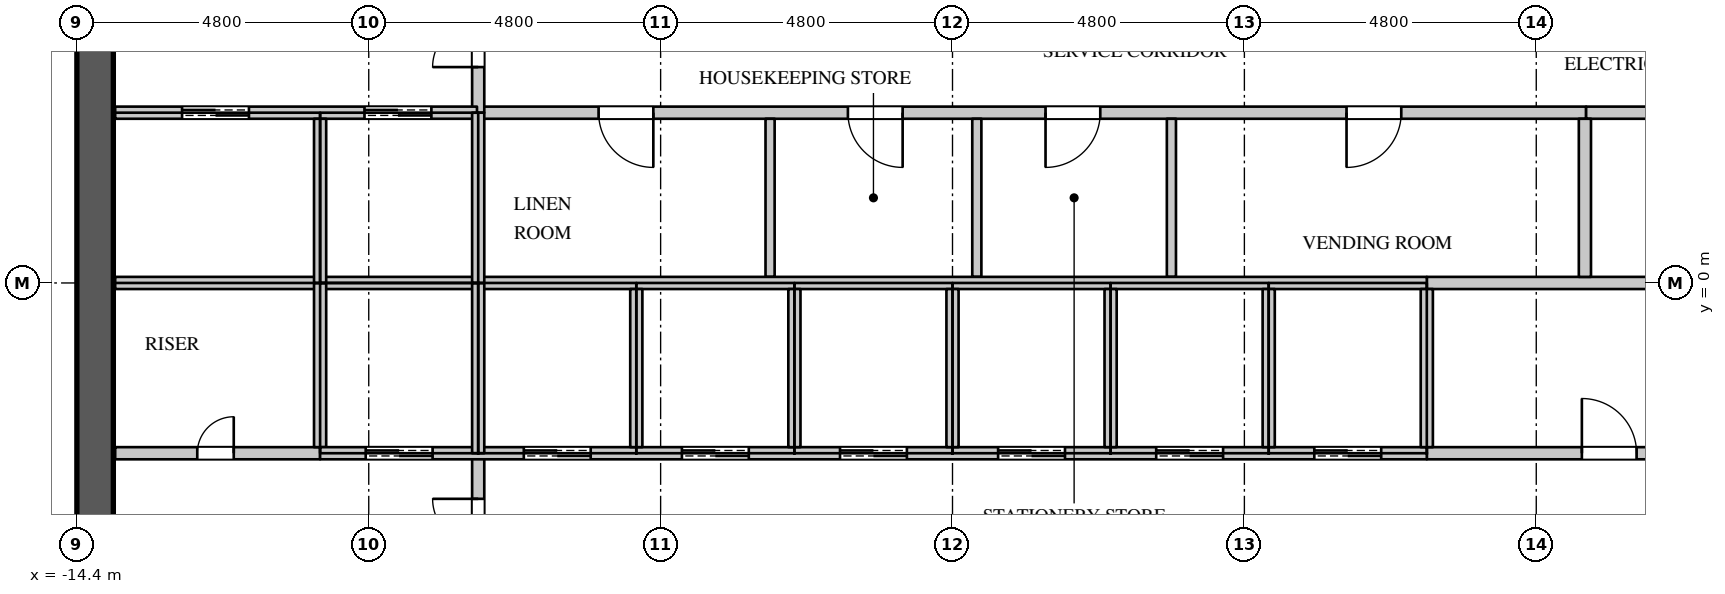
"""IFC4 building model, lengths in metres.
Left out: names, types, materials, properties, quantities, classifications, styles, units other than length and angle.
Written with IfcOpenShell. Run it as: python <this file> out.ifc"""

import sys

from ifc_helpers import new_model, si_unit, direction, frame, frame_2d, origin, place, context, subcontext, project, spatial, rectangle, extrude, element, fill, save


model = new_model("IFC4")
c1 = context("Model", 3, precision=1e-05, world=origin(), true_north=direction((0.0, 1.0)))
c2 = subcontext(c1, "Body", "Model", "MODEL_VIEW")
j1 = project(units=[si_unit("LENGTHUNIT", "METRE"), si_unit("PLANEANGLEUNIT", "RADIAN")], contexts=[c1])
p1 = place(None, origin())
s1 = spatial("IfcSite", under=j1, at=p1, CompositionType="ELEMENT")
p2 = place(p1, origin())
s2 = spatial("IfcBuilding", under=s1, at=p2, CompositionType="ELEMENT")
p3 = place(p2, frame((0.0, 0.0, 310.5)))
s3 = spatial("IfcBuildingStorey", under=s2, at=p3, CompositionType="ELEMENT", Elevation=310.5)
p4 = place(p3, frame((-14.1, -11.4, 0.0), z_axis=(0.0, 0.0, 1.0), x_axis=(0.0, 1.0, 0.0)))
e1 = element("IfcWall", 1, at=p4, inside=s3, PredefinedType="SHEAR", context=c2, shape_type="SweptSolid", body=[
    extrude(rectangle(XDim=22.8, YDim=0.6, at=frame_2d((11.4, 0.0))), origin(), (0.0, 0.0, 1.0), 4.2),
])
p5 = place(p4, frame((20.45, 0.0, 0.0)))
e2 = element("IfcOpeningElement", 2, at=p5, cuts=e1, PredefinedType="OPENING", context=c2, shape_type="SweptSolid", body=[
    extrude(rectangle(XDim=1.1, YDim=2.2, at=frame_2d((0.55, 1.1))), frame((0.0, 0.31, 0.0), z_axis=(0.0, -1.0, 0.0), x_axis=(1.0, 0.0, 0.0)), (0.0, 0.0, 1.0), 0.62),
])
p6 = place(p4, frame((1.25, 0.0, 0.0)))
e3 = element("IfcOpeningElement", 3, at=p6, cuts=e1, PredefinedType="OPENING", context=c2, shape_type="SweptSolid", body=[
    extrude(rectangle(XDim=1.1, YDim=2.2, at=frame_2d((0.55, 1.1))), frame((0.0, 0.31, 0.0), z_axis=(0.0, -1.0, 0.0), x_axis=(1.0, 0.0, 0.0)), (0.0, 0.0, 1.0), 0.62),
])
p7 = place(p4, frame((16.15, 0.0, 0.0)))
e4 = element("IfcOpeningElement", 4, at=p7, cuts=e1, PredefinedType="OPENING", context=c2, shape_type="SweptSolid", body=[
    extrude(rectangle(XDim=1.5, YDim=2.4, at=frame_2d((0.75, 1.2))), frame((0.0, 0.31, 0.0), z_axis=(0.0, -1.0, 0.0), x_axis=(1.0, 0.0, 0.0)), (0.0, 0.0, 1.0), 0.62),
])
p8 = place(p4, frame((5.15, 0.0, 0.0)))
e5 = element("IfcOpeningElement", 5, at=p8, cuts=e1, PredefinedType="OPENING", context=c2, shape_type="SweptSolid", body=[
    extrude(rectangle(XDim=1.5, YDim=2.4, at=frame_2d((0.75, 1.2))), frame((0.0, 0.31, 0.0), z_axis=(0.0, -1.0, 0.0), x_axis=(1.0, 0.0, 0.0)), (0.0, 0.0, 1.0), 0.62),
])
p9 = place(p3, frame((-7.82, 2.8, 0.0), z_axis=(0.0, 0.0, 1.0), x_axis=(1.0, 0.0, 0.0)))
e6 = element("IfcWall", 6, at=p9, inside=s3, PredefinedType="PARTITIONING", context=c2, shape_type="SweptSolid", body=[
    extrude(rectangle(XDim=18.24, YDim=0.2, at=frame_2d((9.12, 0.0))), origin(), (0.0, 0.0, 1.0), 3.9),
])
p10 = place(p9, frame((2.0, 0.0, 0.0)))
e7 = element("IfcOpeningElement", 7, at=p10, cuts=e6, PredefinedType="OPENING", context=c2, shape_type="SweptSolid", body=[
    extrude(rectangle(XDim=0.9, YDim=2.2, at=frame_2d((0.45, 1.1))), frame((0.0, 0.11, 0.0), z_axis=(0.0, -1.0, 0.0), x_axis=(1.0, 0.0, 0.0)), (0.0, 0.0, 1.0), 0.22),
])
p11 = place(p9, frame((6.1, 0.0, 0.0)))
e8 = element("IfcOpeningElement", 8, at=p11, cuts=e6, PredefinedType="OPENING", context=c2, shape_type="SweptSolid", body=[
    extrude(rectangle(XDim=0.9, YDim=2.2, at=frame_2d((0.45, 1.1))), frame((0.0, 0.11, 0.0), z_axis=(0.0, -1.0, 0.0), x_axis=(1.0, 0.0, 0.0)), (0.0, 0.0, 1.0), 0.22),
])
p12 = place(p9, frame((9.35, 0.0, 0.0)))
e9 = element("IfcOpeningElement", 9, at=p12, cuts=e6, PredefinedType="OPENING", context=c2, shape_type="SweptSolid", body=[
    extrude(rectangle(XDim=0.9, YDim=2.2, at=frame_2d((0.45, 1.1))), frame((0.0, 0.11, 0.0), z_axis=(0.0, -1.0, 0.0), x_axis=(1.0, 0.0, 0.0)), (0.0, 0.0, 1.0), 0.22),
])
p13 = place(p9, frame((14.3, 0.0, 0.0)))
e10 = element("IfcOpeningElement", 10, at=p13, cuts=e6, PredefinedType="OPENING", context=c2, shape_type="SweptSolid", body=[
    extrude(rectangle(XDim=0.9, YDim=2.2, at=frame_2d((0.45, 1.1))), frame((0.0, 0.11, 0.0), z_axis=(0.0, -1.0, 0.0), x_axis=(1.0, 0.0, 0.0)), (0.0, 0.0, 1.0), 0.22),
])
p14 = place(p3, frame((-7.8, -5.8, 0.0), z_axis=(0.0, 0.0, 1.0), x_axis=(0.0, 1.0, 0.0)))
e11 = element("IfcWall", 11, at=p14, inside=s3, PredefinedType="PARTITIONING", context=c2, shape_type="SweptSolid", body=[
    extrude(rectangle(XDim=3.0, YDim=0.2, at=frame_2d((1.5, 0.0))), origin(), (0.0, 0.0, 1.0), 3.9),
])
p15 = place(p14, frame((0.75, 0.0, 0.0)))
e12 = element("IfcOpeningElement", 12, at=p15, cuts=e11, PredefinedType="OPENING", context=c2, shape_type="SweptSolid", body=[
    extrude(rectangle(XDim=1.5, YDim=2.4, at=frame_2d((0.75, 1.2))), frame((0.0, 0.11, 0.0), z_axis=(0.0, -1.0, 0.0), x_axis=(1.0, 0.0, 0.0)), (0.0, 0.0, 1.0), 0.22),
])
p16 = place(p3, frame((-7.8, 2.8, 0.0), z_axis=(0.0, 0.0, 1.0), x_axis=(0.0, 1.0, 0.0)))
e13 = element("IfcWall", 13, at=p16, inside=s3, PredefinedType="PARTITIONING", context=c2, shape_type="SweptSolid", body=[
    extrude(rectangle(XDim=5.275, YDim=0.2, at=frame_2d((2.637, 0.0))), origin(), (0.0, 0.0, 1.0), 3.9),
])
p17 = place(p16, frame((0.75, 0.0, 0.0)))
e14 = element("IfcOpeningElement", 14, at=p17, cuts=e13, PredefinedType="OPENING", context=c2, shape_type="SweptSolid", body=[
    extrude(rectangle(XDim=1.5, YDim=2.4, at=frame_2d((0.75, 1.2))), frame((0.0, 0.11, 0.0), z_axis=(0.0, -1.0, 0.0), x_axis=(1.0, 0.0, 0.0)), (0.0, 0.0, 1.0), 0.22),
])
for number, where, z_axis, x_axis in (
    (15, (-3.0, 0.1, 0.0), (0.0, 0.0, 1.0), (0.0, 1.0, 0.0)),
    (16, (0.4, 0.1, 0.0), (0.0, 0.0, 1.0), (0.0, 1.0, 0.0)),
    (17, (3.6, 0.1, 0.0), (0.0, 0.0, 1.0), (0.0, 1.0, 0.0)),
):
    element("IfcWall", number, at=place(p3, frame(where, z_axis=z_axis, x_axis=x_axis)), inside=s3, PredefinedType="PARTITIONING", context=c2, shape_type="SweptSolid", body=[
        extrude(rectangle(XDim=2.6, YDim=0.15, at=frame_2d((1.3, 0.0))), origin(), (0.0, 0.0, 1.0), 3.9),
    ])
p18 = place(p3, frame((-13.77, -2.8, 0.0), z_axis=(0.0, 0.0, 1.0), x_axis=(1.0, 0.0, 0.0)))
e18 = element("IfcWall", 18, at=p18, inside=s3, PredefinedType="PARTITIONING", context=c2, shape_type="SweptSolid", body=[
    extrude(rectangle(XDim=3.37, YDim=0.2, at=frame_2d((1.685, 0.0))), origin(), (0.0, 0.0, 1.0), 3.9),
])
p19 = place(p18, frame((1.35, 0.0, 0.0)))
e19 = element("IfcOpeningElement", 19, at=p19, cuts=e18, PredefinedType="OPENING", context=c2, shape_type="SweptSolid", body=[
    extrude(rectangle(XDim=0.6, YDim=2.0, at=frame_2d((0.3, 1.0))), frame((0.0, 0.11, 0.0), z_axis=(0.0, -1.0, 0.0), x_axis=(1.0, 0.0, 0.0)), (0.0, 0.0, 1.0), 0.22),
])
p20 = place(p3, frame((7.8, -2.8, 0.0), z_axis=(0.0, 0.0, 1.0), x_axis=(1.0, 0.0, 0.0)))
e20 = element("IfcWall", 20, at=p20, inside=s3, PredefinedType="PARTITIONING", context=c2, shape_type="SweptSolid", body=[
    extrude(rectangle(XDim=5.97, YDim=0.2, at=frame_2d((2.985, 0.0))), origin(), (0.0, 0.0, 1.0), 3.9),
])
p21 = place(p20, frame((2.55, 0.0, 0.0)))
e21 = element("IfcOpeningElement", 21, at=p21, cuts=e20, PredefinedType="OPENING", context=c2, shape_type="SweptSolid", body=[
    extrude(rectangle(XDim=0.9, YDim=2.2, at=frame_2d((0.45, 1.1))), frame((0.0, 0.11, 0.0), z_axis=(0.0, -1.0, 0.0), x_axis=(1.0, 0.0, 0.0)), (0.0, 0.0, 1.0), 0.22),
])
p22 = place(p3, frame((7.8, 0.0, 0.0), z_axis=(0.0, 0.0, 1.0), x_axis=(1.0, 0.0, 0.0)))
e22 = element("IfcWall", 22, at=p22, inside=s3, PredefinedType="PARTITIONING", context=c2, shape_type="SweptSolid", body=[
    extrude(rectangle(XDim=5.97, YDim=0.2, at=frame_2d((2.985, 0.0))), origin(), (0.0, 0.0, 1.0), 3.9),
])
p23 = place(p3, frame((10.42, 2.8, 0.0), z_axis=(0.0, 0.0, 1.0), x_axis=(1.0, 0.0, 0.0)))
e23 = element("IfcWall", 23, at=p23, inside=s3, PredefinedType="PARTITIONING", context=c2, shape_type="SweptSolid", body=[
    extrude(rectangle(XDim=3.35, YDim=0.2, at=frame_2d((1.675, 0.0))), origin(), (0.0, 0.0, 1.0), 3.9),
])
p24 = place(p23, frame((1.35, 0.0, 0.0)))
e24 = element("IfcOpeningElement", 24, at=p24, cuts=e23, PredefinedType="OPENING", context=c2, shape_type="SweptSolid", body=[
    extrude(rectangle(XDim=0.6, YDim=2.0, at=frame_2d((0.3, 1.0))), frame((0.0, 0.11, 0.0), z_axis=(0.0, -1.0, 0.0), x_axis=(1.0, 0.0, 0.0)), (0.0, 0.0, 1.0), 0.22),
])
p25 = place(p3, frame((10.4, 0.1, 0.0), z_axis=(0.0, 0.0, 1.0), x_axis=(0.0, 1.0, 0.0)))
e25 = element("IfcWall", 25, at=p25, inside=s3, PredefinedType="PARTITIONING", context=c2, shape_type="SweptSolid", body=[
    extrude(rectangle(XDim=2.6, YDim=0.2, at=frame_2d((1.3, 0.0))), origin(), (0.0, 0.0, 1.0), 3.9),
])
p26 = place(p3, frame((-13.77, 0.0, 0.0), z_axis=(0.0, 0.0, 1.0), x_axis=(1.0, 0.0, 0.0)))
e26 = element("IfcWall", 26, at=p26, inside=s3, PredefinedType="PARTITIONING", context=c2, shape_type="SweptSolid", body=[
    extrude(rectangle(XDim=21.57, YDim=0.2, at=frame_2d((10.785, 0.0))), origin(), (0.0, 0.0, 1.0), 3.9),
])
p27 = place(p3, frame((-13.77, 2.8, 0.0), z_axis=(0.0, 0.0, 1.0), x_axis=(1.0, 0.0, 0.0)))
e27 = element("IfcWall", 27, at=p27, inside=s3, PredefinedType="PARTITIONING", context=c2, shape_type="SweptSolid", body=[
    extrude(rectangle(XDim=5.95, YDim=0.2, at=frame_2d((2.975, 0.0))), origin(), (0.0, 0.0, 1.0), 3.9),
])
p28 = place(p27, frame((1.1, 0.0, 0.0)))
e28 = element("IfcOpeningElement", 28, at=p28, cuts=e27, PredefinedType="OPENING", context=c2, shape_type="SweptSolid", body=[
    extrude(rectangle(XDim=1.1, YDim=2.2, at=frame_2d((0.55, 1.1))), frame((0.0, 0.11, 0.0), z_axis=(0.0, -1.0, 0.0), x_axis=(1.0, 0.0, 0.0)), (0.0, 0.0, 1.0), 0.22),
])
p29 = place(p27, frame((4.1, 0.0, 0.0)))
e29 = element("IfcOpeningElement", 29, at=p29, cuts=e27, PredefinedType="OPENING", context=c2, shape_type="SweptSolid", body=[
    extrude(rectangle(XDim=1.1, YDim=2.2, at=frame_2d((0.55, 1.1))), frame((0.0, 0.11, 0.0), z_axis=(0.0, -1.0, 0.0), x_axis=(1.0, 0.0, 0.0)), (0.0, 0.0, 1.0), 0.22),
])
p30 = place(p3, frame((-10.4, -2.7, 0.0), z_axis=(0.0, 0.0, 1.0), x_axis=(0.0, 1.0, 0.0)))
e30 = element("IfcWall", 30, at=p30, inside=s3, PredefinedType="PARTITIONING", context=c2, shape_type="SweptSolid", body=[
    extrude(rectangle(XDim=2.7, YDim=0.2, at=frame_2d((1.35, 0.0))), origin(), (0.0, 0.0, 1.0), 3.9),
])
p31 = place(p3, frame((-10.4, -2.8, 0.0), z_axis=(0.0, 0.0, 1.0), x_axis=(1.0, 0.0, 0.0)))
e31 = element("IfcWall", 31, at=p31, inside=s3, PredefinedType="PARTITIONING", context=c2, shape_type="SweptSolid", body=[
    extrude(rectangle(XDim=18.2, YDim=0.2, at=frame_2d((9.1, 0.0))), origin(), (0.0, 0.0, 1.0), 3.9),
])
p32 = place(p31, frame((0.75, 0.0, 0.0)))
e32 = element("IfcOpeningElement", 32, at=p32, cuts=e31, PredefinedType="OPENING", context=c2, shape_type="SweptSolid", body=[
    extrude(rectangle(XDim=1.1, YDim=2.2, at=frame_2d((0.55, 1.1))), frame((0.0, 0.11, 0.0), z_axis=(0.0, -1.0, 0.0), x_axis=(1.0, 0.0, 0.0)), (0.0, 0.0, 1.0), 0.22),
])
p33 = place(p31, frame((3.35, 0.0, 0.0)))
e33 = element("IfcOpeningElement", 33, at=p33, cuts=e31, PredefinedType="OPENING", context=c2, shape_type="SweptSolid", body=[
    extrude(rectangle(XDim=1.1, YDim=2.2, at=frame_2d((0.55, 1.1))), frame((0.0, 0.11, 0.0), z_axis=(0.0, -1.0, 0.0), x_axis=(1.0, 0.0, 0.0)), (0.0, 0.0, 1.0), 0.22),
])
p34 = place(p31, frame((5.95, 0.0, 0.0)))
e34 = element("IfcOpeningElement", 34, at=p34, cuts=e31, PredefinedType="OPENING", context=c2, shape_type="SweptSolid", body=[
    extrude(rectangle(XDim=1.1, YDim=2.2, at=frame_2d((0.55, 1.1))), frame((0.0, 0.11, 0.0), z_axis=(0.0, -1.0, 0.0), x_axis=(1.0, 0.0, 0.0)), (0.0, 0.0, 1.0), 0.22),
])
p35 = place(p31, frame((8.55, 0.0, 0.0)))
e35 = element("IfcOpeningElement", 35, at=p35, cuts=e31, PredefinedType="OPENING", context=c2, shape_type="SweptSolid", body=[
    extrude(rectangle(XDim=1.1, YDim=2.2, at=frame_2d((0.55, 1.1))), frame((0.0, 0.11, 0.0), z_axis=(0.0, -1.0, 0.0), x_axis=(1.0, 0.0, 0.0)), (0.0, 0.0, 1.0), 0.22),
])
p36 = place(p31, frame((11.15, 0.0, 0.0)))
e36 = element("IfcOpeningElement", 36, at=p36, cuts=e31, PredefinedType="OPENING", context=c2, shape_type="SweptSolid", body=[
    extrude(rectangle(XDim=1.1, YDim=2.2, at=frame_2d((0.55, 1.1))), frame((0.0, 0.11, 0.0), z_axis=(0.0, -1.0, 0.0), x_axis=(1.0, 0.0, 0.0)), (0.0, 0.0, 1.0), 0.22),
])
p37 = place(p31, frame((13.75, 0.0, 0.0)))
e37 = element("IfcOpeningElement", 37, at=p37, cuts=e31, PredefinedType="OPENING", context=c2, shape_type="SweptSolid", body=[
    extrude(rectangle(XDim=1.1, YDim=2.2, at=frame_2d((0.55, 1.1))), frame((0.0, 0.11, 0.0), z_axis=(0.0, -1.0, 0.0), x_axis=(1.0, 0.0, 0.0)), (0.0, 0.0, 1.0), 0.22),
])
p38 = place(p31, frame((16.35, 0.0, 0.0)))
e38 = element("IfcOpeningElement", 38, at=p38, cuts=e31, PredefinedType="OPENING", context=c2, shape_type="SweptSolid", body=[
    extrude(rectangle(XDim=1.1, YDim=2.2, at=frame_2d((0.55, 1.1))), frame((0.0, 0.11, 0.0), z_axis=(0.0, -1.0, 0.0), x_axis=(1.0, 0.0, 0.0)), (0.0, 0.0, 1.0), 0.22),
])
p39 = place(p3, frame((-10.4, 0.0, 0.0), z_axis=(0.0, 0.0, 1.0), x_axis=(0.0, 1.0, 0.0)))
e39 = element("IfcWall", 39, at=p39, inside=s3, PredefinedType="PARTITIONING", context=c2, shape_type="SweptSolid", body=[
    extrude(rectangle(XDim=2.7, YDim=0.2, at=frame_2d((1.35, 0.0))), origin(), (0.0, 0.0, 1.0), 3.9),
])
for number, where, z_axis, x_axis in (
    (40, (-7.8, -2.8, 0.0), (0.0, 0.0, 1.0), (0.0, 1.0, 0.0)),
    (41, (-7.8, 0.0, 0.0), (0.0, 0.0, 1.0), (0.0, 1.0, 0.0)),
):
    element("IfcWall", number, at=place(p3, frame(where, z_axis=z_axis, x_axis=x_axis)), inside=s3, PredefinedType="PARTITIONING", context=c2, shape_type="SweptSolid", body=[
        extrude(rectangle(XDim=2.8, YDim=0.2, at=frame_2d((1.4, 0.0))), origin(), (0.0, 0.0, 1.0), 3.9),
    ])
for number, where, z_axis, x_axis in (
    (42, (-5.2, -2.7, 0.0), (0.0, 0.0, 1.0), (0.0, 1.0, 0.0)),
    (43, (-2.6, -2.7, 0.0), (0.0, 0.0, 1.0), (0.0, 1.0, 0.0)),
    (44, (0.0, -2.7, 0.0), (0.0, 0.0, 1.0), (0.0, 1.0, 0.0)),
    (45, (2.6, -2.7, 0.0), (0.0, 0.0, 1.0), (0.0, 1.0, 0.0)),
    (46, (5.2, -2.7, 0.0), (0.0, 0.0, 1.0), (0.0, 1.0, 0.0)),
    (47, (7.8, -2.7, 0.0), (0.0, 0.0, 1.0), (0.0, 1.0, 0.0)),
):
    element("IfcWall", number, at=place(p3, frame(where, z_axis=z_axis, x_axis=x_axis)), inside=s3, PredefinedType="PARTITIONING", context=c2, shape_type="SweptSolid", body=[
        extrude(rectangle(XDim=2.6, YDim=0.2, at=frame_2d((1.3, 0.0))), origin(), (0.0, 0.0, 1.0), 3.9),
    ])
p40 = place(p19, origin())
e48 = element("IfcDoor", 48, at=p40, inside=s3, OperationType="SINGLE_SWING_RIGHT", PredefinedType="DOOR", context=c2, shape_type="SweptSolid", body=[
    extrude(rectangle(XDim=0.6, YDim=2.0, at=frame_2d((0.3, 1.0))), frame((0.0, 0.025, 0.0), z_axis=(0.0, -1.0, 0.0), x_axis=(1.0, 0.0, 0.0)), (0.0, 0.0, 1.0), 0.05),
])
fill(e19, e48)
p41 = place(p21, origin())
e49 = element("IfcDoor", 49, at=p41, inside=s3, OperationType="SINGLE_SWING_LEFT", PredefinedType="DOOR", context=c2, shape_type="SweptSolid", body=[
    extrude(rectangle(XDim=0.9, YDim=2.2, at=frame_2d((0.45, 1.1))), frame((0.0, 0.025, 0.0), z_axis=(0.0, -1.0, 0.0), x_axis=(1.0, 0.0, 0.0)), (0.0, 0.0, 1.0), 0.05),
])
fill(e21, e49)
p42 = place(p10, origin())
e50 = element("IfcDoor", 50, at=p42, inside=s3, OperationType="SINGLE_SWING_LEFT", PredefinedType="DOOR", context=c2, shape_type="SweptSolid", body=[
    extrude(rectangle(XDim=0.9, YDim=2.2, at=frame_2d((0.45, 1.1))), frame((0.0, 0.025, 0.0), z_axis=(0.0, -1.0, 0.0), x_axis=(1.0, 0.0, 0.0)), (0.0, 0.0, 1.0), 0.05),
])
fill(e7, e50)
p43 = place(p11, origin())
e51 = element("IfcDoor", 51, at=p43, inside=s3, OperationType="SINGLE_SWING_LEFT", PredefinedType="DOOR", context=c2, shape_type="SweptSolid", body=[
    extrude(rectangle(XDim=0.9, YDim=2.2, at=frame_2d((0.45, 1.1))), frame((0.0, 0.025, 0.0), z_axis=(0.0, -1.0, 0.0), x_axis=(1.0, 0.0, 0.0)), (0.0, 0.0, 1.0), 0.05),
])
fill(e8, e51)
p44 = place(p12, origin())
e52 = element("IfcDoor", 52, at=p44, inside=s3, OperationType="SINGLE_SWING_RIGHT", PredefinedType="DOOR", context=c2, shape_type="SweptSolid", body=[
    extrude(rectangle(XDim=0.9, YDim=2.2, at=frame_2d((0.45, 1.1))), frame((0.0, 0.025, 0.0), z_axis=(0.0, -1.0, 0.0), x_axis=(1.0, 0.0, 0.0)), (0.0, 0.0, 1.0), 0.05),
])
fill(e9, e52)
p45 = place(p13, origin())
e53 = element("IfcDoor", 53, at=p45, inside=s3, OperationType="SINGLE_SWING_RIGHT", PredefinedType="DOOR", context=c2, shape_type="SweptSolid", body=[
    extrude(rectangle(XDim=0.9, YDim=2.2, at=frame_2d((0.45, 1.1))), frame((0.0, 0.025, 0.0), z_axis=(0.0, -1.0, 0.0), x_axis=(1.0, 0.0, 0.0)), (0.0, 0.0, 1.0), 0.05),
])
fill(e10, e53)
p46 = place(p28, origin())
e54 = element("IfcDoor", 54, at=p46, inside=s3, OperationType="DOUBLE_DOOR_SLIDING", PredefinedType="DOOR", context=c2, shape_type="SweptSolid", body=[
    extrude(rectangle(XDim=1.1, YDim=2.2, at=frame_2d((0.55, 1.1))), frame((0.0, 0.025, 0.0), z_axis=(0.0, -1.0, 0.0), x_axis=(1.0, 0.0, 0.0)), (0.0, 0.0, 1.0), 0.05),
])
fill(e28, e54)
p47 = place(p29, origin())
e55 = element("IfcDoor", 55, at=p47, inside=s3, OperationType="DOUBLE_DOOR_SLIDING", PredefinedType="DOOR", context=c2, shape_type="SweptSolid", body=[
    extrude(rectangle(XDim=1.1, YDim=2.2, at=frame_2d((0.55, 1.1))), frame((0.0, 0.025, 0.0), z_axis=(0.0, -1.0, 0.0), x_axis=(1.0, 0.0, 0.0)), (0.0, 0.0, 1.0), 0.05),
])
fill(e29, e55)
p48 = place(p32, origin())
e56 = element("IfcDoor", 56, at=p48, inside=s3, OperationType="DOUBLE_DOOR_SLIDING", PredefinedType="DOOR", context=c2, shape_type="SweptSolid", body=[
    extrude(rectangle(XDim=1.1, YDim=2.2, at=frame_2d((0.55, 1.1))), frame((0.0, 0.025, 0.0), z_axis=(0.0, -1.0, 0.0), x_axis=(1.0, 0.0, 0.0)), (0.0, 0.0, 1.0), 0.05),
])
fill(e32, e56)
p49 = place(p33, origin())
e57 = element("IfcDoor", 57, at=p49, inside=s3, OperationType="DOUBLE_DOOR_SLIDING", PredefinedType="DOOR", context=c2, shape_type="SweptSolid", body=[
    extrude(rectangle(XDim=1.1, YDim=2.2, at=frame_2d((0.55, 1.1))), frame((0.0, 0.025, 0.0), z_axis=(0.0, -1.0, 0.0), x_axis=(1.0, 0.0, 0.0)), (0.0, 0.0, 1.0), 0.05),
])
fill(e33, e57)
p50 = place(p34, origin())
e58 = element("IfcDoor", 58, at=p50, inside=s3, OperationType="DOUBLE_DOOR_SLIDING", PredefinedType="DOOR", context=c2, shape_type="SweptSolid", body=[
    extrude(rectangle(XDim=1.1, YDim=2.2, at=frame_2d((0.55, 1.1))), frame((0.0, 0.025, 0.0), z_axis=(0.0, -1.0, 0.0), x_axis=(1.0, 0.0, 0.0)), (0.0, 0.0, 1.0), 0.05),
])
fill(e34, e58)
p51 = place(p35, origin())
e59 = element("IfcDoor", 59, at=p51, inside=s3, OperationType="DOUBLE_DOOR_SLIDING", PredefinedType="DOOR", context=c2, shape_type="SweptSolid", body=[
    extrude(rectangle(XDim=1.1, YDim=2.2, at=frame_2d((0.55, 1.1))), frame((0.0, 0.025, 0.0), z_axis=(0.0, -1.0, 0.0), x_axis=(1.0, 0.0, 0.0)), (0.0, 0.0, 1.0), 0.05),
])
fill(e35, e59)
p52 = place(p36, origin())
e60 = element("IfcDoor", 60, at=p52, inside=s3, OperationType="DOUBLE_DOOR_SLIDING", PredefinedType="DOOR", context=c2, shape_type="SweptSolid", body=[
    extrude(rectangle(XDim=1.1, YDim=2.2, at=frame_2d((0.55, 1.1))), frame((0.0, 0.025, 0.0), z_axis=(0.0, -1.0, 0.0), x_axis=(1.0, 0.0, 0.0)), (0.0, 0.0, 1.0), 0.05),
])
fill(e36, e60)
p53 = place(p37, origin())
e61 = element("IfcDoor", 61, at=p53, inside=s3, OperationType="DOUBLE_DOOR_SLIDING", PredefinedType="DOOR", context=c2, shape_type="SweptSolid", body=[
    extrude(rectangle(XDim=1.1, YDim=2.2, at=frame_2d((0.55, 1.1))), frame((0.0, 0.025, 0.0), z_axis=(0.0, -1.0, 0.0), x_axis=(1.0, 0.0, 0.0)), (0.0, 0.0, 1.0), 0.05),
])
fill(e37, e61)
p54 = place(p38, origin())
e62 = element("IfcDoor", 62, at=p54, inside=s3, OperationType="DOUBLE_DOOR_SLIDING", PredefinedType="DOOR", context=c2, shape_type="SweptSolid", body=[
    extrude(rectangle(XDim=1.1, YDim=2.2, at=frame_2d((0.55, 1.1))), frame((0.0, 0.025, 0.0), z_axis=(0.0, -1.0, 0.0), x_axis=(1.0, 0.0, 0.0)), (0.0, 0.0, 1.0), 0.05),
])
fill(e38, e62)
p55 = place(p17, origin())
e63 = element("IfcDoor", 63, at=p55, inside=s3, OperationType="DOUBLE_DOOR_SINGLE_SWING", PredefinedType="DOOR", context=c2, shape_type="SweptSolid", body=[
    extrude(rectangle(XDim=1.5, YDim=2.4, at=frame_2d((0.75, 1.2))), frame((0.0, 0.025, 0.0), z_axis=(0.0, -1.0, 0.0), x_axis=(1.0, 0.0, 0.0)), (0.0, 0.0, 1.0), 0.05),
])
fill(e14, e63)
p56 = place(p15, origin())
e64 = element("IfcDoor", 64, at=p56, inside=s3, OperationType="DOUBLE_DOOR_SINGLE_SWING", PredefinedType="DOOR", context=c2, shape_type="SweptSolid", body=[
    extrude(rectangle(XDim=1.5, YDim=2.4, at=frame_2d((0.75, 1.2))), frame((0.0, 0.025, 0.0), z_axis=(0.0, -1.0, 0.0), x_axis=(1.0, 0.0, 0.0)), (0.0, 0.0, 1.0), 0.05),
])
fill(e12, e64)
save(model, sys.argv[1])
